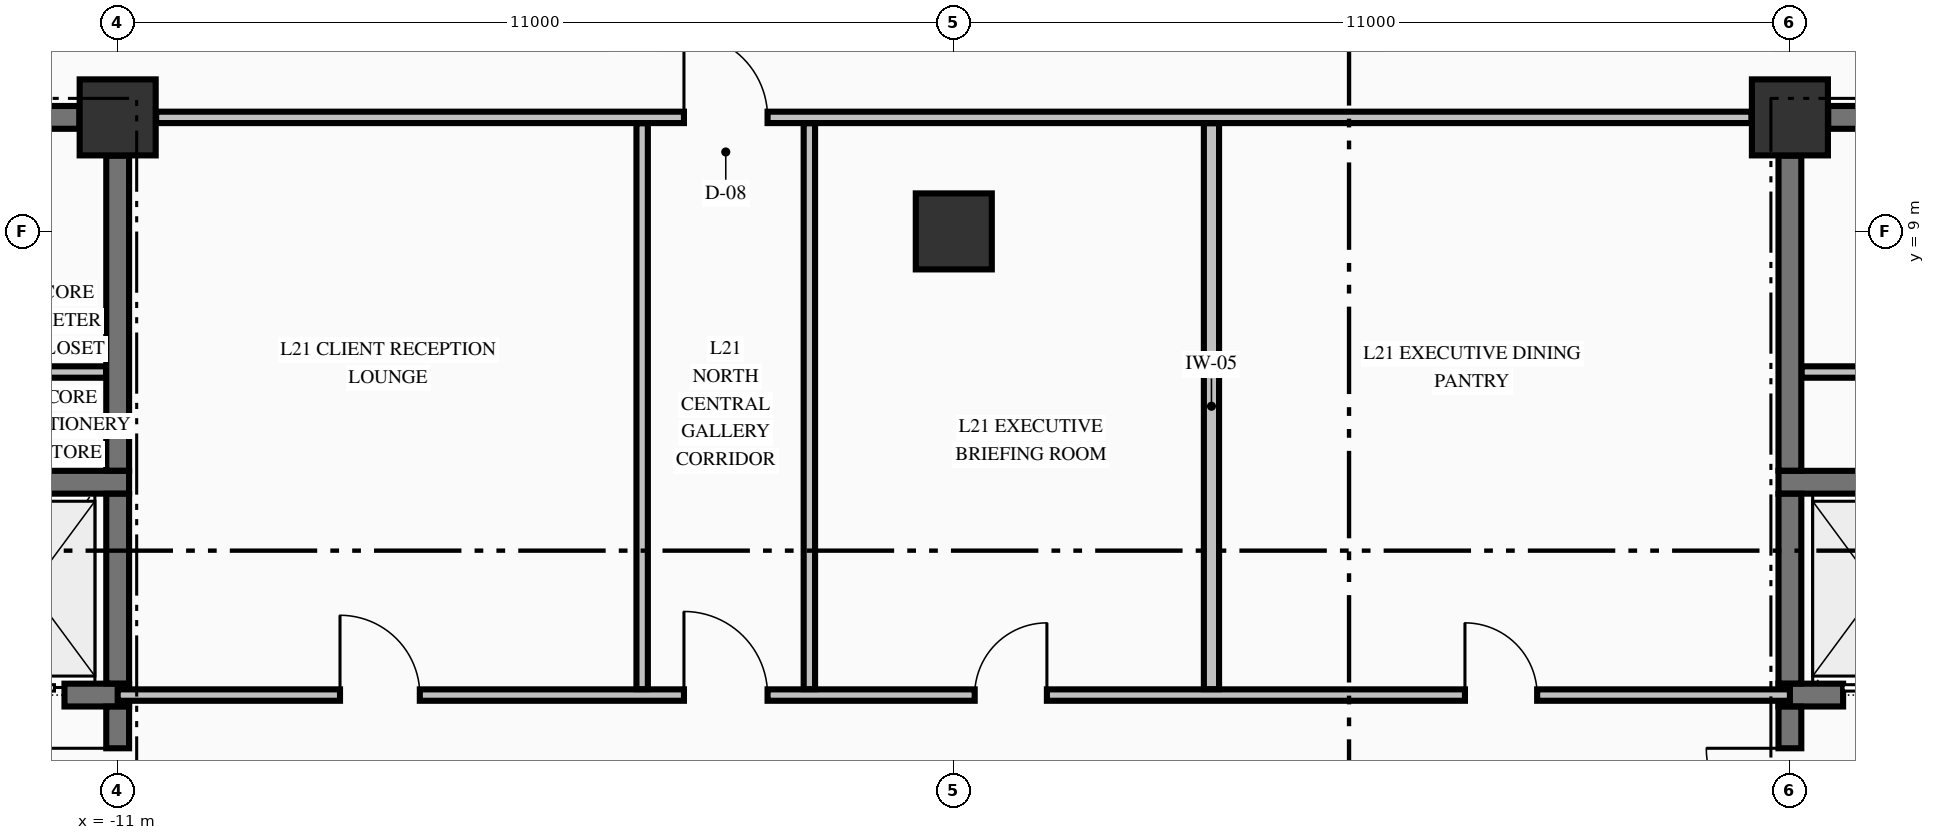
"""IFC4 building model, lengths in metres.
Left out: names, types, materials, properties, quantities, classifications, styles, units other than length and angle.
Written with IfcOpenShell. Run it as: python <this file> out.ifc"""

import sys

from ifc_helpers import new_model, si_unit, direction, frame, frame_2d, origin, origin_2d, place, context, subcontext, project, spatial, rectangle, extrude, element, fill, save


model = new_model("IFC4")
c1 = context("Model", 3, precision=1e-05, world=origin(), true_north=direction((0.0, 1.0)))
c2 = subcontext(c1, "Body", "Model", "MODEL_VIEW")
j1 = project(units=[si_unit("LENGTHUNIT", "METRE"), si_unit("PLANEANGLEUNIT", "RADIAN")], contexts=[c1])
p1 = place(None, origin())
s1 = spatial("IfcSite", under=j1, at=p1, CompositionType="ELEMENT")
p2 = place(p1, origin())
s2 = spatial("IfcBuilding", under=s1, at=p2, CompositionType="ELEMENT")
p3 = place(p2, frame((0.0, 0.0, 86.94)))
s3 = spatial("IfcBuildingStorey", under=s2, at=p3, CompositionType="ELEMENT", Elevation=86.94)
for number, where, z_axis, x_axis in (
    (1, (-11.0, 10.5, -0.425), (0.0, 0.0, 1.0), (1.0, 0.0, 0.0)),
    (2, (11.0, 10.5, -0.425), (0.0, 0.0, 1.0), (1.0, 0.0, 0.0)),
    (3, (0.0, 9.0, -0.425), (0.0, 0.0, 1.0), (1.0, 0.0, 0.0)),
):
    element("IfcColumn", number, at=place(p3, frame(where, z_axis=z_axis, x_axis=x_axis)), inside=s3, PredefinedType="COLUMN", context=c2, shape_type="SweptSolid", body=[
        extrude(rectangle(XDim=1.0, YDim=1.0, at=origin_2d()), origin(), (0.0, 0.0, 1.0), 4.595),
    ])
p4 = place(p3, frame((-14.875, 2.9, 0.0), z_axis=(0.0, 0.0, 1.0), x_axis=(1.0, 0.0, 0.0)))
e4 = element("IfcWall", 4, at=p4, inside=s3, PredefinedType="SHEAR", context=c2, shape_type="SweptSolid", body=[
    extrude(rectangle(XDim=4.025, YDim=0.3, at=frame_2d((2.012, 0.0))), origin(), (0.0, 0.0, 1.0), 4.17),
])
p5 = place(p4, frame((2.075, 0.0, 0.0)))
e5 = element("IfcOpeningElement", 5, at=p5, cuts=e4, PredefinedType="OPENING", context=c2, shape_type="SweptSolid", body=[
    extrude(rectangle(XDim=1.1, YDim=2.2, at=frame_2d((0.55, 1.1))), frame((0.0, 0.16, 0.0), z_axis=(0.0, -1.0, 0.0), x_axis=(1.0, 0.0, 0.0)), (0.0, 0.0, 1.0), 0.32),
])
p6 = place(p3, frame((10.85, 2.9, 0.0), z_axis=(0.0, 0.0, 1.0), x_axis=(1.0, 0.0, 0.0)))
e6 = element("IfcWall", 6, at=p6, inside=s3, PredefinedType="SHEAR", context=c2, shape_type="SweptSolid", body=[
    extrude(rectangle(XDim=4.025, YDim=0.3, at=frame_2d((2.012, 0.0))), origin(), (0.0, 0.0, 1.0), 4.17),
])
p7 = place(p6, frame((0.85, 0.0, 0.0)))
e7 = element("IfcOpeningElement", 7, at=p7, cuts=e6, PredefinedType="OPENING", context=c2, shape_type="SweptSolid", body=[
    extrude(rectangle(XDim=1.1, YDim=2.2, at=frame_2d((0.55, 1.1))), frame((0.0, 0.16, 0.0), z_axis=(0.0, -1.0, 0.0), x_axis=(1.0, 0.0, 0.0)), (0.0, 0.0, 1.0), 0.32),
])
for number, where, z_axis, x_axis in (
    (8, (-14.875, 5.7, 0.0), (0.0, 0.0, 1.0), (1.0, 0.0, 0.0)),
    (9, (10.85, 5.7, 0.0), (0.0, 0.0, 1.0), (1.0, 0.0, 0.0)),
):
    element("IfcWall", number, at=place(p3, frame(where, z_axis=z_axis, x_axis=x_axis)), inside=s3, PredefinedType="SHEAR", context=c2, shape_type="SweptSolid", body=[
        extrude(rectangle(XDim=4.025, YDim=0.3, at=frame_2d((2.012, 0.0))), origin(), (0.0, 0.0, 1.0), 4.17),
    ])
p8 = place(p3, frame((-14.7, 10.5, 0.0), z_axis=(0.0, 0.0, 1.0), x_axis=(1.0, 0.0, 0.0)))
e10 = element("IfcWall", 10, at=p8, inside=s3, PredefinedType="SHEAR", context=c2, shape_type="SweptSolid", body=[
    extrude(rectangle(XDim=3.196, YDim=0.3, at=frame_2d((1.598, 0.0))), origin(), (0.0, 0.0, 1.0), 4.17),
])
p9 = place(p8, frame((0.305, 0.0, 0.0)))
e11 = element("IfcOpeningElement", 11, at=p9, cuts=e10, PredefinedType="OPENING", context=c2, shape_type="SweptSolid", body=[
    extrude(rectangle(XDim=0.95, YDim=2.15, at=frame_2d((0.475, 1.075))), frame((0.0, 0.16, 0.0), z_axis=(0.0, -1.0, 0.0), x_axis=(1.0, 0.0, 0.0)), (0.0, 0.0, 1.0), 0.32),
])
p10 = place(p3, frame((11.504, 10.5, 0.0), z_axis=(0.0, 0.0, 1.0), x_axis=(1.0, 0.0, 0.0)))
e12 = element("IfcWall", 12, at=p10, inside=s3, PredefinedType="SHEAR", context=c2, shape_type="SweptSolid", body=[
    extrude(rectangle(XDim=3.196, YDim=0.3, at=frame_2d((1.598, 0.0))), origin(), (0.0, 0.0, 1.0), 4.17),
])
p11 = place(p10, frame((1.941, 0.0, 0.0)))
e13 = element("IfcOpeningElement", 13, at=p11, cuts=e12, PredefinedType="OPENING", context=c2, shape_type="SweptSolid", body=[
    extrude(rectangle(XDim=0.95, YDim=2.15, at=frame_2d((0.475, 1.075))), frame((0.0, 0.16, 0.0), z_axis=(0.0, -1.0, 0.0), x_axis=(1.0, 0.0, 0.0)), (0.0, 0.0, 1.0), 0.32),
])
p12 = place(p3, frame((-11.0, 2.9, 0.0), z_axis=(0.0, 0.0, 1.0), x_axis=(1.0, 0.0, 0.0)))
e14 = element("IfcWall", 14, at=p12, inside=s3, PredefinedType="PARTITIONING", context=c2, shape_type="SweptSolid", body=[
    extrude(rectangle(XDim=22.0, YDim=0.15, at=frame_2d((11.0, 0.0))), origin(), (0.0, 0.0, 1.0), 4.17),
])
p13 = place(p12, frame((7.45, 0.0, 0.0)))
e15 = element("IfcOpeningElement", 15, at=p13, cuts=e14, PredefinedType="OPENING", context=c2, shape_type="SweptSolid", body=[
    extrude(rectangle(XDim=1.1, YDim=2.15, at=frame_2d((0.55, 1.075))), frame((0.0, 0.085, 0.0), z_axis=(0.0, -1.0, 0.0), x_axis=(1.0, 0.0, 0.0)), (0.0, 0.0, 1.0), 0.17),
])
p14 = place(p12, frame((2.925, 0.0, 0.0)))
e16 = element("IfcOpeningElement", 16, at=p14, cuts=e14, PredefinedType="OPENING", context=c2, shape_type="SweptSolid", body=[
    extrude(rectangle(XDim=1.05, YDim=2.15, at=frame_2d((0.525, 1.075))), frame((0.0, 0.085, 0.0), z_axis=(0.0, -1.0, 0.0), x_axis=(1.0, 0.0, 0.0)), (0.0, 0.0, 1.0), 0.17),
])
p15 = place(p12, frame((11.275, 0.0, 0.0)))
e17 = element("IfcOpeningElement", 17, at=p15, cuts=e14, PredefinedType="OPENING", context=c2, shape_type="SweptSolid", body=[
    extrude(rectangle(XDim=0.95, YDim=2.15, at=frame_2d((0.475, 1.075))), frame((0.0, 0.085, 0.0), z_axis=(0.0, -1.0, 0.0), x_axis=(1.0, 0.0, 0.0)), (0.0, 0.0, 1.0), 0.17),
])
p16 = place(p12, frame((17.725, 0.0, 0.0)))
e18 = element("IfcOpeningElement", 18, at=p16, cuts=e14, PredefinedType="OPENING", context=c2, shape_type="SweptSolid", body=[
    extrude(rectangle(XDim=0.95, YDim=2.15, at=frame_2d((0.475, 1.075))), frame((0.0, 0.085, 0.0), z_axis=(0.0, -1.0, 0.0), x_axis=(1.0, 0.0, 0.0)), (0.0, 0.0, 1.0), 0.17),
])
for number, where, z_axis, x_axis in (
    (19, (-13.225, 7.15, 0.0), (0.0, 0.0, 1.0), (1.0, 0.0, 0.0)),
    (20, (11.153, 7.15, 0.0), (0.0, 0.0, 1.0), (1.0, 0.0, 0.0)),
):
    element("IfcWall", number, at=place(p3, frame(where, z_axis=z_axis, x_axis=x_axis)), inside=s3, PredefinedType="PARTITIONING", context=c2, shape_type="SweptSolid", body=[
        extrude(rectangle(XDim=2.072, YDim=0.15, at=frame_2d((1.036, 0.0))), origin(), (0.0, 0.0, 1.0), 4.17),
    ])
p17 = place(p3, frame((-10.494, 10.5, 0.0), z_axis=(0.0, 0.0, 1.0), x_axis=(1.0, 0.0, 0.0)))
e21 = element("IfcWall", 21, at=p17, inside=s3, PredefinedType="PARTITIONING", context=c2, shape_type="SweptSolid", body=[
    extrude(rectangle(XDim=20.988, YDim=0.15, at=frame_2d((10.494, 0.0))), origin(), (0.0, 0.0, 1.0), 4.17),
])
p18 = place(p17, frame((6.944, 0.0, 0.0)))
e22 = element("IfcOpeningElement", 22, at=p18, cuts=e21, PredefinedType="OPENING", context=c2, shape_type="SweptSolid", body=[
    extrude(rectangle(XDim=1.1, YDim=2.15, at=frame_2d((0.55, 1.075))), frame((0.0, 0.085, 0.0), z_axis=(0.0, -1.0, 0.0), x_axis=(1.0, 0.0, 0.0)), (0.0, 0.0, 1.0), 0.17),
])
p19 = place(p3, frame((-11.0, 0.504, 0.0), z_axis=(0.0, 0.0, 1.0), x_axis=(0.0, 1.0, 0.0)))
e23 = element("IfcWall", 23, at=p19, inside=s3, PredefinedType="SHEAR", context=c2, shape_type="SweptSolid", body=[
    extrude(rectangle(XDim=2.244, YDim=0.3, at=frame_2d((1.122, 0.0))), origin(), (0.0, 0.0, 1.0), 4.17),
])
p20 = place(p19, frame((0.596, 0.0, 0.0)))
e24 = element("IfcOpeningElement", 24, at=p20, cuts=e23, PredefinedType="OPENING", context=c2, shape_type="SweptSolid", body=[
    extrude(rectangle(XDim=1.1, YDim=2.15, at=frame_2d((0.55, 1.075))), frame((0.0, 0.16, 0.0), z_axis=(0.0, -1.0, 0.0), x_axis=(1.0, 0.0, 0.0)), (0.0, 0.0, 1.0), 0.32),
])
p21 = place(p3, frame((-11.0, 3.052, 0.0), z_axis=(0.0, 0.0, 1.0), x_axis=(0.0, 1.0, 0.0)))
e25 = element("IfcWall", 25, at=p21, inside=s3, PredefinedType="SHEAR", context=c2, shape_type="SweptSolid", body=[
    extrude(rectangle(XDim=2.496, YDim=0.3, at=frame_2d((1.248, 0.0))), origin(), (0.0, 0.0, 1.0), 4.17),
])
p22 = place(p3, frame((-11.0, 5.852, 0.0), z_axis=(0.0, 0.0, 1.0), x_axis=(0.0, 1.0, 0.0)))
e26 = element("IfcWall", 26, at=p22, inside=s3, PredefinedType="SHEAR", context=c2, shape_type="SweptSolid", body=[
    extrude(rectangle(XDim=4.144, YDim=0.3, at=frame_2d((2.072, 0.0))), origin(), (0.0, 0.0, 1.0), 4.17),
])
p23 = place(p3, frame((11.0, 0.504, 0.0), z_axis=(0.0, 0.0, 1.0), x_axis=(0.0, 1.0, 0.0)))
e27 = element("IfcWall", 27, at=p23, inside=s3, PredefinedType="SHEAR", context=c2, shape_type="SweptSolid", body=[
    extrude(rectangle(XDim=2.244, YDim=0.3, at=frame_2d((1.122, 0.0))), origin(), (0.0, 0.0, 1.0), 4.17),
])
p24 = place(p23, frame((0.596, 0.0, 0.0)))
e28 = element("IfcOpeningElement", 28, at=p24, cuts=e27, PredefinedType="OPENING", context=c2, shape_type="SweptSolid", body=[
    extrude(rectangle(XDim=1.1, YDim=2.15, at=frame_2d((0.55, 1.075))), frame((0.0, 0.16, 0.0), z_axis=(0.0, -1.0, 0.0), x_axis=(1.0, 0.0, 0.0)), (0.0, 0.0, 1.0), 0.32),
])
p25 = place(p3, frame((11.0, 3.052, 0.0), z_axis=(0.0, 0.0, 1.0), x_axis=(0.0, 1.0, 0.0)))
e29 = element("IfcWall", 29, at=p25, inside=s3, PredefinedType="SHEAR", context=c2, shape_type="SweptSolid", body=[
    extrude(rectangle(XDim=2.496, YDim=0.3, at=frame_2d((1.248, 0.0))), origin(), (0.0, 0.0, 1.0), 4.17),
])
p26 = place(p3, frame((11.0, 5.852, 0.0), z_axis=(0.0, 0.0, 1.0), x_axis=(0.0, 1.0, 0.0)))
e30 = element("IfcWall", 30, at=p26, inside=s3, PredefinedType="SHEAR", context=c2, shape_type="SweptSolid", body=[
    extrude(rectangle(XDim=4.144, YDim=0.3, at=frame_2d((2.072, 0.0))), origin(), (0.0, 0.0, 1.0), 4.17),
])
for number, where, z_axis, x_axis in (
    (31, (-4.1, 2.978, 0.0), (0.0, 0.0, 1.0), (0.0, 1.0, 0.0)),
    (32, (-1.9, 2.978, 0.0), (0.0, 0.0, 1.0), (0.0, 1.0, 0.0)),
):
    element("IfcWall", number, at=place(p3, frame(where, z_axis=z_axis, x_axis=x_axis)), inside=s3, PredefinedType="PARTITIONING", context=c2, shape_type="SweptSolid", body=[
        extrude(rectangle(XDim=7.444, YDim=0.15, at=frame_2d((3.722, 0.0))), origin(), (0.0, 0.0, 1.0), 4.17),
    ])
p27 = place(p3, frame((3.39, 2.978, 0.0), z_axis=(0.0, 0.0, 1.0), x_axis=(0.0, 1.0, 0.0)))
e33 = element("IfcWall", 33, at=p27, inside=s3, PredefinedType="PARTITIONING", context=c2, shape_type="SweptSolid", body=[
    extrude(rectangle(XDim=7.444, YDim=0.2, at=frame_2d((3.722, 0.0))), origin(), (0.0, 0.0, 1.0), 4.17),
])
p28 = place(p20, origin())
e34 = element("IfcDoor", 34, at=p28, inside=s3, OperationType="SINGLE_SWING_RIGHT", PredefinedType="DOOR", context=c2, shape_type="SweptSolid", body=[
    extrude(rectangle(XDim=1.1, YDim=2.15, at=frame_2d((0.55, 1.075))), frame((0.0, 0.025, 0.0), z_axis=(0.0, -1.0, 0.0), x_axis=(1.0, 0.0, 0.0)), (0.0, 0.0, 1.0), 0.05),
])
fill(e24, e34)
p29 = place(p5, origin())
e35 = element("IfcDoor", 35, at=p29, inside=s3, OperationType="SLIDING_TO_LEFT", PredefinedType="DOOR", context=c2, shape_type="SweptSolid", body=[
    extrude(rectangle(XDim=1.1, YDim=2.2, at=frame_2d((0.55, 1.1))), frame((0.0, 0.025, 0.0), z_axis=(0.0, -1.0, 0.0), x_axis=(1.0, 0.0, 0.0)), (0.0, 0.0, 1.0), 0.05),
])
fill(e5, e35)
p30 = place(p24, origin())
e36 = element("IfcDoor", 36, at=p30, inside=s3, OperationType="SINGLE_SWING_RIGHT", PredefinedType="DOOR", context=c2, shape_type="SweptSolid", body=[
    extrude(rectangle(XDim=1.1, YDim=2.15, at=frame_2d((0.55, 1.075))), frame((0.0, 0.025, 0.0), z_axis=(0.0, -1.0, 0.0), x_axis=(1.0, 0.0, 0.0)), (0.0, 0.0, 1.0), 0.05),
])
fill(e28, e36)
p31 = place(p7, origin())
e37 = element("IfcDoor", 37, at=p31, inside=s3, OperationType="SLIDING_TO_RIGHT", PredefinedType="DOOR", context=c2, shape_type="SweptSolid", body=[
    extrude(rectangle(XDim=1.1, YDim=2.2, at=frame_2d((0.55, 1.1))), frame((0.0, 0.025, 0.0), z_axis=(0.0, -1.0, 0.0), x_axis=(1.0, 0.0, 0.0)), (0.0, 0.0, 1.0), 0.05),
])
fill(e7, e37)
p32 = place(p18, origin())
e38 = element("IfcDoor", 38, at=p32, inside=s3, OperationType="SINGLE_SWING_LEFT", PredefinedType="DOOR", context=c2, shape_type="SweptSolid", body=[
    extrude(rectangle(XDim=1.1, YDim=2.15, at=frame_2d((0.55, 1.075))), frame((0.0, 0.025, 0.0), z_axis=(0.0, -1.0, 0.0), x_axis=(1.0, 0.0, 0.0)), (0.0, 0.0, 1.0), 0.05),
])
fill(e22, e38)
p33 = place(p13, origin())
e39 = element("IfcDoor", 39, at=p33, inside=s3, OperationType="SINGLE_SWING_LEFT", PredefinedType="DOOR", context=c2, shape_type="SweptSolid", body=[
    extrude(rectangle(XDim=1.1, YDim=2.15, at=frame_2d((0.55, 1.075))), frame((0.0, 0.025, 0.0), z_axis=(0.0, -1.0, 0.0), x_axis=(1.0, 0.0, 0.0)), (0.0, 0.0, 1.0), 0.05),
])
fill(e15, e39)
p34 = place(p14, origin())
e40 = element("IfcDoor", 40, at=p34, inside=s3, OperationType="SINGLE_SWING_LEFT", PredefinedType="DOOR", context=c2, shape_type="SweptSolid", body=[
    extrude(rectangle(XDim=1.05, YDim=2.15, at=frame_2d((0.525, 1.075))), frame((0.0, 0.025, 0.0), z_axis=(0.0, -1.0, 0.0), x_axis=(1.0, 0.0, 0.0)), (0.0, 0.0, 1.0), 0.05),
])
fill(e16, e40)
p35 = place(p15, origin())
e41 = element("IfcDoor", 41, at=p35, inside=s3, OperationType="SINGLE_SWING_RIGHT", PredefinedType="DOOR", context=c2, shape_type="SweptSolid", body=[
    extrude(rectangle(XDim=0.95, YDim=2.15, at=frame_2d((0.475, 1.075))), frame((0.0, 0.025, 0.0), z_axis=(0.0, -1.0, 0.0), x_axis=(1.0, 0.0, 0.0)), (0.0, 0.0, 1.0), 0.05),
])
fill(e17, e41)
p36 = place(p16, origin())
e42 = element("IfcDoor", 42, at=p36, inside=s3, OperationType="SINGLE_SWING_LEFT", PredefinedType="DOOR", context=c2, shape_type="SweptSolid", body=[
    extrude(rectangle(XDim=0.95, YDim=2.15, at=frame_2d((0.475, 1.075))), frame((0.0, 0.025, 0.0), z_axis=(0.0, -1.0, 0.0), x_axis=(1.0, 0.0, 0.0)), (0.0, 0.0, 1.0), 0.05),
])
fill(e18, e42)
save(model, sys.argv[1])
